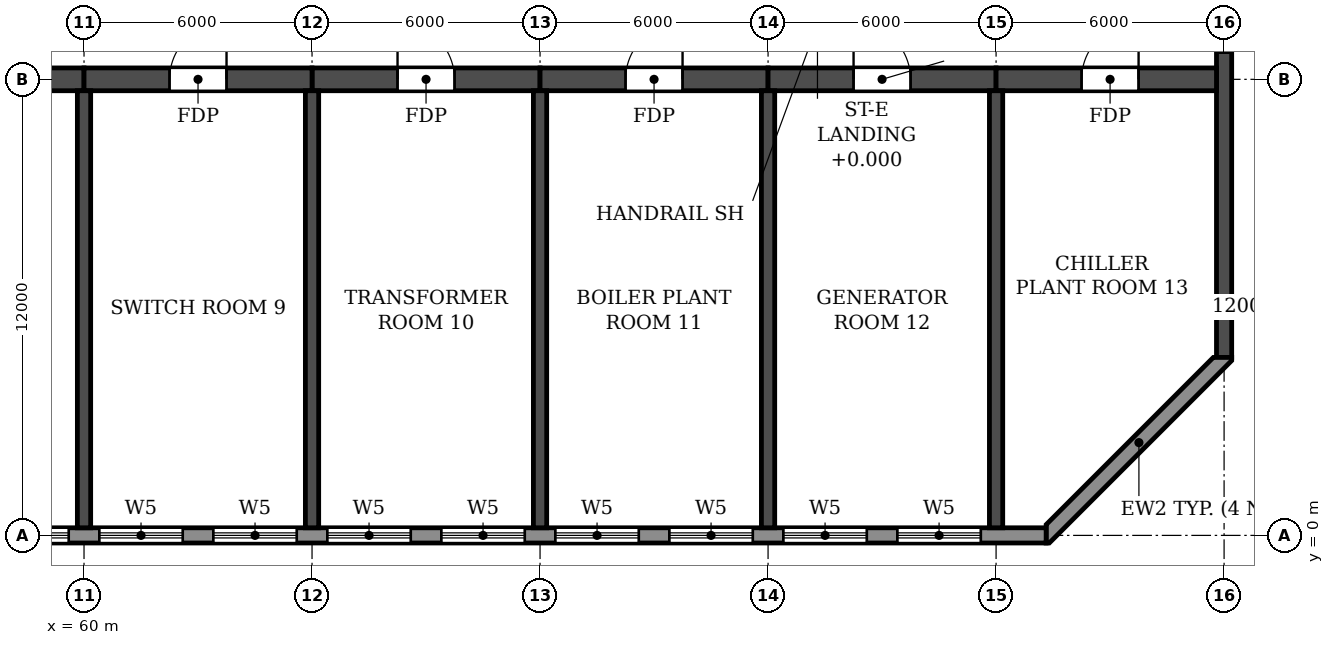
"""IFC4 building model, lengths in metres.
Left out: names, types, materials, properties, quantities, classifications, styles, units other than length and angle.
Written with IfcOpenShell. Run it as: python <this file> out.ifc"""

import sys

from ifc_helpers import new_model, si_unit, direction, frame, frame_2d, origin, place, context, subcontext, project, spatial, polyline, rectangle, outline, extrude, element, fill, save


model = new_model("IFC4")
c1 = context("Model", 3, precision=1e-05, world=origin(), true_north=direction((0.0, 1.0)))
c2 = subcontext(c1, "Body", "Model", "MODEL_VIEW")
j1 = project(units=[si_unit("LENGTHUNIT", "METRE"), si_unit("PLANEANGLEUNIT", "RADIAN")], contexts=[c1])
p1 = place(None, origin())
s1 = spatial("IfcSite", under=j1, at=p1, CompositionType="ELEMENT")
p2 = place(p1, origin())
s2 = spatial("IfcBuilding", under=s1, at=p2, CompositionType="ELEMENT")
p3 = place(p2, frame((0.0, 0.0, 115.8)))
s3 = spatial("IfcBuildingStorey", under=s2, at=p3, CompositionType="ELEMENT", Elevation=115.8)
for number, where, z_axis, x_axis in (
    (1, (60.0, 0.2, 0.0), (0.0, 0.0, 1.0), (0.0, 1.0, 0.0)),
    (2, (66.0, 0.2, 0.0), (0.0, 0.0, 1.0), (0.0, 1.0, 0.0)),
    (3, (72.0, 0.2, 0.0), (0.0, 0.0, 1.0), (0.0, 1.0, 0.0)),
    (4, (78.0, 0.2, 0.0), (0.0, 0.0, 1.0), (0.0, 1.0, 0.0)),
    (5, (84.0, 0.2, 0.0), (0.0, 0.0, 1.0), (0.0, 1.0, 0.0)),
):
    element("IfcWall", number, at=place(p3, frame(where, z_axis=z_axis, x_axis=x_axis)), inside=s3, PredefinedType="SHEAR", context=c2, shape_type="SweptSolid", body=[
        extrude(rectangle(XDim=11.5, YDim=0.35, at=frame_2d((5.75, 0.0))), origin(), (0.0, 0.0, 1.0), 6.37),
    ])
p4 = place(p3, frame((90.0, 4.683, 0.0), z_axis=(0.0, 0.0, 1.0), x_axis=(0.0, 1.0, 0.0)))
e6 = element("IfcWall", 6, at=p4, inside=s3, PredefinedType="SHEAR", context=c2, shape_type="SweptSolid", body=[
    extrude(rectangle(XDim=34.234, YDim=0.4, at=frame_2d((17.117, 0.0))), origin(), (0.0, 0.0, 1.0), 6.37),
])
p5 = place(p4, frame((23.817, 0.0, 0.9)))
e7 = element("IfcOpeningElement", 7, at=p5, cuts=e6, PredefinedType="OPENING", context=c2, shape_type="SweptSolid", body=[
    extrude(rectangle(XDim=1.2, YDim=1.5, at=frame_2d((0.6, 0.75))), frame((0.0, 0.21, 0.0), z_axis=(0.0, -1.0, 0.0), x_axis=(1.0, 0.0, 0.0)), (0.0, 0.0, 1.0), 0.42),
])
p6 = place(p4, frame((8.017, 0.0, 0.9)))
e8 = element("IfcOpeningElement", 8, at=p6, cuts=e6, PredefinedType="OPENING", context=c2, shape_type="SweptSolid", body=[
    extrude(rectangle(XDim=1.2, YDim=1.5, at=frame_2d((0.6, 0.75))), frame((0.0, 0.21, 0.0), z_axis=(0.0, -1.0, 0.0), x_axis=(1.0, 0.0, 0.0)), (0.0, 0.0, 1.0), 0.42),
])
p7 = place(p4, frame((13.317, 0.0, 0.9)))
e9 = element("IfcOpeningElement", 9, at=p7, cuts=e6, PredefinedType="OPENING", context=c2, shape_type="SweptSolid", body=[
    extrude(rectangle(XDim=1.2, YDim=1.5, at=frame_2d((0.6, 0.75))), frame((0.0, 0.21, 0.0), z_axis=(0.0, -1.0, 0.0), x_axis=(1.0, 0.0, 0.0)), (0.0, 0.0, 1.0), 0.42),
])
p8 = place(p3, frame((54.0, 12.0, 0.0), z_axis=(0.0, 0.0, 1.0), x_axis=(1.0, 0.0, 0.0)))
e10 = element("IfcWall", 10, at=p8, inside=s3, PredefinedType="SHEAR", context=c2, shape_type="SweptSolid", body=[
    extrude(rectangle(XDim=6.0, YDim=0.6, at=frame_2d((3.0, 0.0))), origin(), (0.0, 0.0, 1.0), 6.37),
])
p9 = place(p8, frame((2.25, 0.0, 0.0)))
e11 = element("IfcOpeningElement", 11, at=p9, cuts=e10, PredefinedType="OPENING", context=c2, shape_type="SweptSolid", body=[
    extrude(rectangle(XDim=1.5, YDim=2.1, at=frame_2d((0.75, 1.05))), frame((0.0, 0.31, 0.0), z_axis=(0.0, -1.0, 0.0), x_axis=(1.0, 0.0, 0.0)), (0.0, 0.0, 1.0), 0.62),
])
p10 = place(p3, frame((60.0, 12.0, 0.0), z_axis=(0.0, 0.0, 1.0), x_axis=(1.0, 0.0, 0.0)))
e12 = element("IfcWall", 12, at=p10, inside=s3, PredefinedType="SHEAR", context=c2, shape_type="SweptSolid", body=[
    extrude(rectangle(XDim=6.0, YDim=0.6, at=frame_2d((3.0, 0.0))), origin(), (0.0, 0.0, 1.0), 6.37),
])
p11 = place(p10, frame((2.25, 0.0, 0.0)))
e13 = element("IfcOpeningElement", 13, at=p11, cuts=e12, PredefinedType="OPENING", context=c2, shape_type="SweptSolid", body=[
    extrude(rectangle(XDim=1.5, YDim=2.1, at=frame_2d((0.75, 1.05))), frame((0.0, 0.31, 0.0), z_axis=(0.0, -1.0, 0.0), x_axis=(1.0, 0.0, 0.0)), (0.0, 0.0, 1.0), 0.62),
])
p12 = place(p3, frame((66.0, 12.0, 0.0), z_axis=(0.0, 0.0, 1.0), x_axis=(1.0, 0.0, 0.0)))
e14 = element("IfcWall", 14, at=p12, inside=s3, PredefinedType="SHEAR", context=c2, shape_type="SweptSolid", body=[
    extrude(rectangle(XDim=6.0, YDim=0.6, at=frame_2d((3.0, 0.0))), origin(), (0.0, 0.0, 1.0), 6.37),
])
p13 = place(p12, frame((2.25, 0.0, 0.0)))
e15 = element("IfcOpeningElement", 15, at=p13, cuts=e14, PredefinedType="OPENING", context=c2, shape_type="SweptSolid", body=[
    extrude(rectangle(XDim=1.5, YDim=2.1, at=frame_2d((0.75, 1.05))), frame((0.0, 0.31, 0.0), z_axis=(0.0, -1.0, 0.0), x_axis=(1.0, 0.0, 0.0)), (0.0, 0.0, 1.0), 0.62),
])
p14 = place(p3, frame((72.0, 12.0, 0.0), z_axis=(0.0, 0.0, 1.0), x_axis=(1.0, 0.0, 0.0)))
e16 = element("IfcWall", 16, at=p14, inside=s3, PredefinedType="SHEAR", context=c2, shape_type="SweptSolid", body=[
    extrude(rectangle(XDim=6.0, YDim=0.6, at=frame_2d((3.0, 0.0))), origin(), (0.0, 0.0, 1.0), 6.37),
])
p15 = place(p14, frame((2.25, 0.0, 0.0)))
e17 = element("IfcOpeningElement", 17, at=p15, cuts=e16, PredefinedType="OPENING", context=c2, shape_type="SweptSolid", body=[
    extrude(rectangle(XDim=1.5, YDim=2.1, at=frame_2d((0.75, 1.05))), frame((0.0, 0.31, 0.0), z_axis=(0.0, -1.0, 0.0), x_axis=(1.0, 0.0, 0.0)), (0.0, 0.0, 1.0), 0.62),
])
p16 = place(p3, frame((78.0, 12.0, 0.0), z_axis=(0.0, 0.0, 1.0), x_axis=(1.0, 0.0, 0.0)))
e18 = element("IfcWall", 18, at=p16, inside=s3, PredefinedType="SHEAR", context=c2, shape_type="SweptSolid", body=[
    extrude(rectangle(XDim=6.0, YDim=0.6, at=frame_2d((3.0, 0.0))), origin(), (0.0, 0.0, 1.0), 6.37),
])
p17 = place(p16, frame((2.25, 0.0, 0.0)))
e19 = element("IfcOpeningElement", 19, at=p17, cuts=e18, PredefinedType="OPENING", context=c2, shape_type="SweptSolid", body=[
    extrude(rectangle(XDim=1.5, YDim=2.1, at=frame_2d((0.75, 1.05))), frame((0.0, 0.31, 0.0), z_axis=(0.0, -1.0, 0.0), x_axis=(1.0, 0.0, 0.0)), (0.0, 0.0, 1.0), 0.62),
])
p18 = place(p3, frame((84.0, 12.0, 0.0), z_axis=(0.0, 0.0, 1.0), x_axis=(1.0, 0.0, 0.0)))
e20 = element("IfcWall", 20, at=p18, inside=s3, PredefinedType="SHEAR", context=c2, shape_type="SweptSolid", body=[
    extrude(rectangle(XDim=5.8, YDim=0.6, at=frame_2d((2.9, 0.0))), origin(), (0.0, 0.0, 1.0), 6.37),
])
p19 = place(p18, frame((2.25, 0.0, 0.0)))
e21 = element("IfcOpeningElement", 21, at=p19, cuts=e20, PredefinedType="OPENING", context=c2, shape_type="SweptSolid", body=[
    extrude(rectangle(XDim=1.5, YDim=2.1, at=frame_2d((0.75, 1.05))), frame((0.0, 0.31, 0.0), z_axis=(0.0, -1.0, 0.0), x_axis=(1.0, 0.0, 0.0)), (0.0, 0.0, 1.0), 0.62),
])
p20 = place(p3, frame((16.683, 0.0, 0.0), z_axis=(0.0, 0.0, 1.0), x_axis=(1.0, 0.0, 0.0)))
e22 = element("IfcWall", 22, at=p20, inside=s3, PredefinedType="STANDARD", context=c2, shape_type="SweptSolid", body=[
    extrude(rectangle(XDim=68.634, YDim=0.4, at=frame_2d((34.317, 0.0))), origin(), (0.0, 0.0, 1.0), 6.37),
])
p21 = place(p20, frame((1.717, 0.0, 0.6)))
e23 = element("IfcOpeningElement", 23, at=p21, cuts=e22, PredefinedType="OPENING", context=c2, shape_type="SweptSolid", body=[
    extrude(rectangle(XDim=2.2, YDim=2.4, at=frame_2d((1.1, 1.2))), frame((0.0, 0.21, 0.0), z_axis=(0.0, -1.0, 0.0), x_axis=(1.0, 0.0, 0.0)), (0.0, 0.0, 1.0), 0.42),
])
p22 = place(p20, frame((4.717, 0.0, 0.6)))
e24 = element("IfcOpeningElement", 24, at=p22, cuts=e22, PredefinedType="OPENING", context=c2, shape_type="SweptSolid", body=[
    extrude(rectangle(XDim=2.2, YDim=2.4, at=frame_2d((1.1, 1.2))), frame((0.0, 0.21, 0.0), z_axis=(0.0, -1.0, 0.0), x_axis=(1.0, 0.0, 0.0)), (0.0, 0.0, 1.0), 0.42),
])
p23 = place(p20, frame((7.717, 0.0, 0.6)))
e25 = element("IfcOpeningElement", 25, at=p23, cuts=e22, PredefinedType="OPENING", context=c2, shape_type="SweptSolid", body=[
    extrude(rectangle(XDim=2.2, YDim=2.4, at=frame_2d((1.1, 1.2))), frame((0.0, 0.21, 0.0), z_axis=(0.0, -1.0, 0.0), x_axis=(1.0, 0.0, 0.0)), (0.0, 0.0, 1.0), 0.42),
])
p24 = place(p20, frame((10.717, 0.0, 0.6)))
e26 = element("IfcOpeningElement", 26, at=p24, cuts=e22, PredefinedType="OPENING", context=c2, shape_type="SweptSolid", body=[
    extrude(rectangle(XDim=2.2, YDim=2.4, at=frame_2d((1.1, 1.2))), frame((0.0, 0.21, 0.0), z_axis=(0.0, -1.0, 0.0), x_axis=(1.0, 0.0, 0.0)), (0.0, 0.0, 1.0), 0.42),
])
p25 = place(p20, frame((13.717, 0.0, 0.6)))
e27 = element("IfcOpeningElement", 27, at=p25, cuts=e22, PredefinedType="OPENING", context=c2, shape_type="SweptSolid", body=[
    extrude(rectangle(XDim=2.2, YDim=2.4, at=frame_2d((1.1, 1.2))), frame((0.0, 0.21, 0.0), z_axis=(0.0, -1.0, 0.0), x_axis=(1.0, 0.0, 0.0)), (0.0, 0.0, 1.0), 0.42),
])
p26 = place(p20, frame((16.717, 0.0, 0.6)))
e28 = element("IfcOpeningElement", 28, at=p26, cuts=e22, PredefinedType="OPENING", context=c2, shape_type="SweptSolid", body=[
    extrude(rectangle(XDim=2.2, YDim=2.4, at=frame_2d((1.1, 1.2))), frame((0.0, 0.21, 0.0), z_axis=(0.0, -1.0, 0.0), x_axis=(1.0, 0.0, 0.0)), (0.0, 0.0, 1.0), 0.42),
])
p27 = place(p20, frame((19.717, 0.0, 0.6)))
e29 = element("IfcOpeningElement", 29, at=p27, cuts=e22, PredefinedType="OPENING", context=c2, shape_type="SweptSolid", body=[
    extrude(rectangle(XDim=2.2, YDim=2.4, at=frame_2d((1.1, 1.2))), frame((0.0, 0.21, 0.0), z_axis=(0.0, -1.0, 0.0), x_axis=(1.0, 0.0, 0.0)), (0.0, 0.0, 1.0), 0.42),
])
p28 = place(p20, frame((22.717, 0.0, 0.6)))
e30 = element("IfcOpeningElement", 30, at=p28, cuts=e22, PredefinedType="OPENING", context=c2, shape_type="SweptSolid", body=[
    extrude(rectangle(XDim=2.2, YDim=2.4, at=frame_2d((1.1, 1.2))), frame((0.0, 0.21, 0.0), z_axis=(0.0, -1.0, 0.0), x_axis=(1.0, 0.0, 0.0)), (0.0, 0.0, 1.0), 0.42),
])
p29 = place(p20, frame((25.717, 0.0, 0.6)))
e31 = element("IfcOpeningElement", 31, at=p29, cuts=e22, PredefinedType="OPENING", context=c2, shape_type="SweptSolid", body=[
    extrude(rectangle(XDim=2.2, YDim=2.4, at=frame_2d((1.1, 1.2))), frame((0.0, 0.21, 0.0), z_axis=(0.0, -1.0, 0.0), x_axis=(1.0, 0.0, 0.0)), (0.0, 0.0, 1.0), 0.42),
])
p30 = place(p20, frame((28.717, 0.0, 0.6)))
e32 = element("IfcOpeningElement", 32, at=p30, cuts=e22, PredefinedType="OPENING", context=c2, shape_type="SweptSolid", body=[
    extrude(rectangle(XDim=2.2, YDim=2.4, at=frame_2d((1.1, 1.2))), frame((0.0, 0.21, 0.0), z_axis=(0.0, -1.0, 0.0), x_axis=(1.0, 0.0, 0.0)), (0.0, 0.0, 1.0), 0.42),
])
p31 = place(p20, frame((31.717, 0.0, 0.6)))
e33 = element("IfcOpeningElement", 33, at=p31, cuts=e22, PredefinedType="OPENING", context=c2, shape_type="SweptSolid", body=[
    extrude(rectangle(XDim=2.2, YDim=2.4, at=frame_2d((1.1, 1.2))), frame((0.0, 0.21, 0.0), z_axis=(0.0, -1.0, 0.0), x_axis=(1.0, 0.0, 0.0)), (0.0, 0.0, 1.0), 0.42),
])
p32 = place(p20, frame((34.717, 0.0, 0.6)))
e34 = element("IfcOpeningElement", 34, at=p32, cuts=e22, PredefinedType="OPENING", context=c2, shape_type="SweptSolid", body=[
    extrude(rectangle(XDim=2.2, YDim=2.4, at=frame_2d((1.1, 1.2))), frame((0.0, 0.21, 0.0), z_axis=(0.0, -1.0, 0.0), x_axis=(1.0, 0.0, 0.0)), (0.0, 0.0, 1.0), 0.42),
])
p33 = place(p20, frame((37.717, 0.0, 0.6)))
e35 = element("IfcOpeningElement", 35, at=p33, cuts=e22, PredefinedType="OPENING", context=c2, shape_type="SweptSolid", body=[
    extrude(rectangle(XDim=2.2, YDim=2.4, at=frame_2d((1.1, 1.2))), frame((0.0, 0.21, 0.0), z_axis=(0.0, -1.0, 0.0), x_axis=(1.0, 0.0, 0.0)), (0.0, 0.0, 1.0), 0.42),
])
p34 = place(p20, frame((40.717, 0.0, 0.6)))
e36 = element("IfcOpeningElement", 36, at=p34, cuts=e22, PredefinedType="OPENING", context=c2, shape_type="SweptSolid", body=[
    extrude(rectangle(XDim=2.2, YDim=2.4, at=frame_2d((1.1, 1.2))), frame((0.0, 0.21, 0.0), z_axis=(0.0, -1.0, 0.0), x_axis=(1.0, 0.0, 0.0)), (0.0, 0.0, 1.0), 0.42),
])
p35 = place(p20, frame((43.717, 0.0, 0.6)))
e37 = element("IfcOpeningElement", 37, at=p35, cuts=e22, PredefinedType="OPENING", context=c2, shape_type="SweptSolid", body=[
    extrude(rectangle(XDim=2.2, YDim=2.4, at=frame_2d((1.1, 1.2))), frame((0.0, 0.21, 0.0), z_axis=(0.0, -1.0, 0.0), x_axis=(1.0, 0.0, 0.0)), (0.0, 0.0, 1.0), 0.42),
])
p36 = place(p20, frame((46.717, 0.0, 0.6)))
e38 = element("IfcOpeningElement", 38, at=p36, cuts=e22, PredefinedType="OPENING", context=c2, shape_type="SweptSolid", body=[
    extrude(rectangle(XDim=2.2, YDim=2.4, at=frame_2d((1.1, 1.2))), frame((0.0, 0.21, 0.0), z_axis=(0.0, -1.0, 0.0), x_axis=(1.0, 0.0, 0.0)), (0.0, 0.0, 1.0), 0.42),
])
p37 = place(p20, frame((49.717, 0.0, 0.6)))
e39 = element("IfcOpeningElement", 39, at=p37, cuts=e22, PredefinedType="OPENING", context=c2, shape_type="SweptSolid", body=[
    extrude(rectangle(XDim=2.2, YDim=2.4, at=frame_2d((1.1, 1.2))), frame((0.0, 0.21, 0.0), z_axis=(0.0, -1.0, 0.0), x_axis=(1.0, 0.0, 0.0)), (0.0, 0.0, 1.0), 0.42),
])
p38 = place(p20, frame((52.717, 0.0, 0.6)))
e40 = element("IfcOpeningElement", 40, at=p38, cuts=e22, PredefinedType="OPENING", context=c2, shape_type="SweptSolid", body=[
    extrude(rectangle(XDim=2.2, YDim=2.4, at=frame_2d((1.1, 1.2))), frame((0.0, 0.21, 0.0), z_axis=(0.0, -1.0, 0.0), x_axis=(1.0, 0.0, 0.0)), (0.0, 0.0, 1.0), 0.42),
])
p39 = place(p20, frame((55.717, 0.0, 0.6)))
e41 = element("IfcOpeningElement", 41, at=p39, cuts=e22, PredefinedType="OPENING", context=c2, shape_type="SweptSolid", body=[
    extrude(rectangle(XDim=2.2, YDim=2.4, at=frame_2d((1.1, 1.2))), frame((0.0, 0.21, 0.0), z_axis=(0.0, -1.0, 0.0), x_axis=(1.0, 0.0, 0.0)), (0.0, 0.0, 1.0), 0.42),
])
p40 = place(p20, frame((58.717, 0.0, 0.6)))
e42 = element("IfcOpeningElement", 42, at=p40, cuts=e22, PredefinedType="OPENING", context=c2, shape_type="SweptSolid", body=[
    extrude(rectangle(XDim=2.2, YDim=2.4, at=frame_2d((1.1, 1.2))), frame((0.0, 0.21, 0.0), z_axis=(0.0, -1.0, 0.0), x_axis=(1.0, 0.0, 0.0)), (0.0, 0.0, 1.0), 0.42),
])
p41 = place(p20, frame((61.717, 0.0, 0.6)))
e43 = element("IfcOpeningElement", 43, at=p41, cuts=e22, PredefinedType="OPENING", context=c2, shape_type="SweptSolid", body=[
    extrude(rectangle(XDim=2.2, YDim=2.4, at=frame_2d((1.1, 1.2))), frame((0.0, 0.21, 0.0), z_axis=(0.0, -1.0, 0.0), x_axis=(1.0, 0.0, 0.0)), (0.0, 0.0, 1.0), 0.42),
])
p42 = place(p20, frame((64.717, 0.0, 0.6)))
e44 = element("IfcOpeningElement", 44, at=p42, cuts=e22, PredefinedType="OPENING", context=c2, shape_type="SweptSolid", body=[
    extrude(rectangle(XDim=2.2, YDim=2.4, at=frame_2d((1.1, 1.2))), frame((0.0, 0.21, 0.0), z_axis=(0.0, -1.0, 0.0), x_axis=(1.0, 0.0, 0.0)), (0.0, 0.0, 1.0), 0.42),
])
p43 = place(p3, origin())
e45 = element("IfcWall", 45, at=p43, inside=s3, PredefinedType="STANDARD", context=c2, shape_type="SweptSolid", body=[
    extrude(outline(polyline([(85.317, -0.2), (85.4, -0.2), (90.2, 4.6), (90.2, 4.683), (89.717, 4.683), (85.317, 0.283), (85.317, -0.2)])), origin(), (0.0, 0.0, 1.0), 6.37),
])
p44 = place(p34, origin())
e46 = element("IfcWindow", 46, at=p44, inside=s3, PartitioningType="TRIPLE_PANEL_HORIZONTAL", PredefinedType="WINDOW", context=c2, shape_type="SweptSolid", body=[
    extrude(rectangle(XDim=2.2, YDim=2.4, at=frame_2d((1.1, 1.2))), frame((0.0, 0.03, 0.0), z_axis=(0.0, -1.0, 0.0), x_axis=(1.0, 0.0, 0.0)), (0.0, 0.0, 1.0), 0.06),
])
fill(e36, e46)
p45 = place(p35, origin())
e47 = element("IfcWindow", 47, at=p45, inside=s3, PartitioningType="TRIPLE_PANEL_HORIZONTAL", PredefinedType="WINDOW", context=c2, shape_type="SweptSolid", body=[
    extrude(rectangle(XDim=2.2, YDim=2.4, at=frame_2d((1.1, 1.2))), frame((0.0, 0.03, 0.0), z_axis=(0.0, -1.0, 0.0), x_axis=(1.0, 0.0, 0.0)), (0.0, 0.0, 1.0), 0.06),
])
fill(e37, e47)
p46 = place(p36, origin())
e48 = element("IfcWindow", 48, at=p46, inside=s3, PartitioningType="TRIPLE_PANEL_HORIZONTAL", PredefinedType="WINDOW", context=c2, shape_type="SweptSolid", body=[
    extrude(rectangle(XDim=2.2, YDim=2.4, at=frame_2d((1.1, 1.2))), frame((0.0, 0.03, 0.0), z_axis=(0.0, -1.0, 0.0), x_axis=(1.0, 0.0, 0.0)), (0.0, 0.0, 1.0), 0.06),
])
fill(e38, e48)
p47 = place(p37, origin())
e49 = element("IfcWindow", 49, at=p47, inside=s3, PartitioningType="TRIPLE_PANEL_HORIZONTAL", PredefinedType="WINDOW", context=c2, shape_type="SweptSolid", body=[
    extrude(rectangle(XDim=2.2, YDim=2.4, at=frame_2d((1.1, 1.2))), frame((0.0, 0.03, 0.0), z_axis=(0.0, -1.0, 0.0), x_axis=(1.0, 0.0, 0.0)), (0.0, 0.0, 1.0), 0.06),
])
fill(e39, e49)
p48 = place(p38, origin())
e50 = element("IfcWindow", 50, at=p48, inside=s3, PartitioningType="TRIPLE_PANEL_HORIZONTAL", PredefinedType="WINDOW", context=c2, shape_type="SweptSolid", body=[
    extrude(rectangle(XDim=2.2, YDim=2.4, at=frame_2d((1.1, 1.2))), frame((0.0, 0.03, 0.0), z_axis=(0.0, -1.0, 0.0), x_axis=(1.0, 0.0, 0.0)), (0.0, 0.0, 1.0), 0.06),
])
fill(e40, e50)
p49 = place(p39, origin())
e51 = element("IfcWindow", 51, at=p49, inside=s3, PartitioningType="TRIPLE_PANEL_HORIZONTAL", PredefinedType="WINDOW", context=c2, shape_type="SweptSolid", body=[
    extrude(rectangle(XDim=2.2, YDim=2.4, at=frame_2d((1.1, 1.2))), frame((0.0, 0.03, 0.0), z_axis=(0.0, -1.0, 0.0), x_axis=(1.0, 0.0, 0.0)), (0.0, 0.0, 1.0), 0.06),
])
fill(e41, e51)
p50 = place(p40, origin())
e52 = element("IfcWindow", 52, at=p50, inside=s3, PartitioningType="TRIPLE_PANEL_HORIZONTAL", PredefinedType="WINDOW", context=c2, shape_type="SweptSolid", body=[
    extrude(rectangle(XDim=2.2, YDim=2.4, at=frame_2d((1.1, 1.2))), frame((0.0, 0.03, 0.0), z_axis=(0.0, -1.0, 0.0), x_axis=(1.0, 0.0, 0.0)), (0.0, 0.0, 1.0), 0.06),
])
fill(e42, e52)
p51 = place(p41, origin())
e53 = element("IfcWindow", 53, at=p51, inside=s3, PartitioningType="TRIPLE_PANEL_HORIZONTAL", PredefinedType="WINDOW", context=c2, shape_type="SweptSolid", body=[
    extrude(rectangle(XDim=2.2, YDim=2.4, at=frame_2d((1.1, 1.2))), frame((0.0, 0.03, 0.0), z_axis=(0.0, -1.0, 0.0), x_axis=(1.0, 0.0, 0.0)), (0.0, 0.0, 1.0), 0.06),
])
fill(e43, e53)
p52 = place(p42, origin())
e54 = element("IfcWindow", 54, at=p52, inside=s3, PartitioningType="TRIPLE_PANEL_HORIZONTAL", PredefinedType="WINDOW", context=c2, shape_type="SweptSolid", body=[
    extrude(rectangle(XDim=2.2, YDim=2.4, at=frame_2d((1.1, 1.2))), frame((0.0, 0.03, 0.0), z_axis=(0.0, -1.0, 0.0), x_axis=(1.0, 0.0, 0.0)), (0.0, 0.0, 1.0), 0.06),
])
fill(e44, e54)
p53 = place(p11, origin())
e55 = element("IfcDoor", 55, at=p53, inside=s3, OperationType="DOUBLE_DOOR_SINGLE_SWING", PredefinedType="DOOR", context=c2, shape_type="SweptSolid", body=[
    extrude(rectangle(XDim=1.5, YDim=2.1, at=frame_2d((0.75, 1.05))), frame((0.0, 0.025, 0.0), z_axis=(0.0, -1.0, 0.0), x_axis=(1.0, 0.0, 0.0)), (0.0, 0.0, 1.0), 0.05),
])
fill(e13, e55)
p54 = place(p13, origin())
e56 = element("IfcDoor", 56, at=p54, inside=s3, OperationType="DOUBLE_DOOR_SINGLE_SWING", PredefinedType="DOOR", context=c2, shape_type="SweptSolid", body=[
    extrude(rectangle(XDim=1.5, YDim=2.1, at=frame_2d((0.75, 1.05))), frame((0.0, 0.025, 0.0), z_axis=(0.0, -1.0, 0.0), x_axis=(1.0, 0.0, 0.0)), (0.0, 0.0, 1.0), 0.05),
])
fill(e15, e56)
p55 = place(p15, origin())
e57 = element("IfcDoor", 57, at=p55, inside=s3, OperationType="DOUBLE_DOOR_SINGLE_SWING", PredefinedType="DOOR", context=c2, shape_type="SweptSolid", body=[
    extrude(rectangle(XDim=1.5, YDim=2.1, at=frame_2d((0.75, 1.05))), frame((0.0, 0.025, 0.0), z_axis=(0.0, -1.0, 0.0), x_axis=(1.0, 0.0, 0.0)), (0.0, 0.0, 1.0), 0.05),
])
fill(e17, e57)
p56 = place(p17, origin())
e58 = element("IfcDoor", 58, at=p56, inside=s3, OperationType="DOUBLE_DOOR_SINGLE_SWING", PredefinedType="DOOR", context=c2, shape_type="SweptSolid", body=[
    extrude(rectangle(XDim=1.5, YDim=2.1, at=frame_2d((0.75, 1.05))), frame((0.0, 0.025, 0.0), z_axis=(0.0, -1.0, 0.0), x_axis=(1.0, 0.0, 0.0)), (0.0, 0.0, 1.0), 0.05),
])
fill(e19, e58)
p57 = place(p19, origin())
e59 = element("IfcDoor", 59, at=p57, inside=s3, OperationType="DOUBLE_DOOR_SINGLE_SWING", PredefinedType="DOOR", context=c2, shape_type="SweptSolid", body=[
    extrude(rectangle(XDim=1.5, YDim=2.1, at=frame_2d((0.75, 1.05))), frame((0.0, 0.025, 0.0), z_axis=(0.0, -1.0, 0.0), x_axis=(1.0, 0.0, 0.0)), (0.0, 0.0, 1.0), 0.05),
])
fill(e21, e59)
save(model, sys.argv[1])
